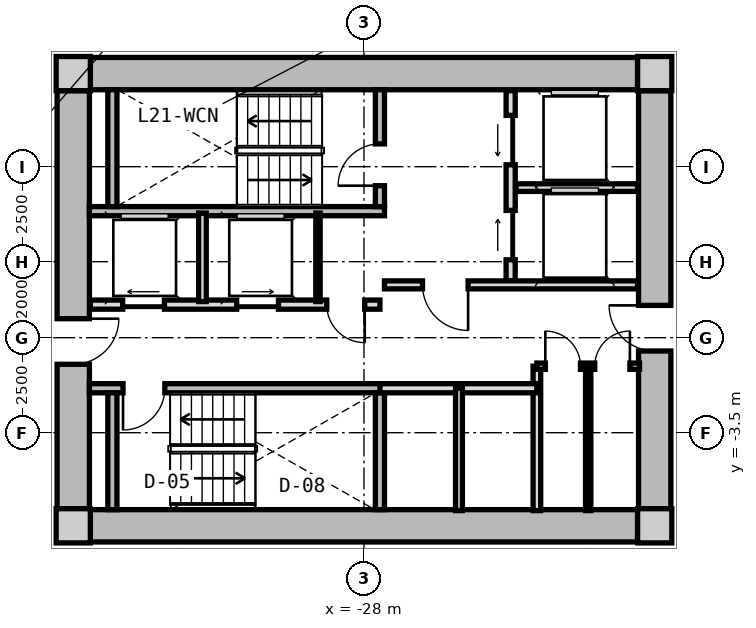
"""IFC4 building model, lengths in metres.
Left out: names, types, materials, properties, quantities, classifications, styles, units other than length and angle.
Written with IfcOpenShell. Run it as: python <this file> out.ifc"""

import sys

from ifc_helpers import new_model, si_unit, direction, frame, frame_2d, origin, origin_2d, place, context, subcontext, project, spatial, rectangle, extrude, source, transform, mapped, element, fill, save


model = new_model("IFC4")
c1 = context("Model", 3, precision=1e-05, world=origin(), true_north=direction((0.0, 1.0)))
c2 = subcontext(c1, "Body", "Model", "MODEL_VIEW")
j1 = project(units=[si_unit("LENGTHUNIT", "METRE"), si_unit("PLANEANGLEUNIT", "RADIAN")], contexts=[c1])
p1 = place(None, origin())
s1 = spatial("IfcSite", under=j1, at=p1, CompositionType="ELEMENT")
p2 = place(p1, origin())
s2 = spatial("IfcBuilding", under=s1, at=p2, CompositionType="ELEMENT")
p3 = place(p2, frame((0.0, 0.0, 70.4)))
s3 = spatial("IfcBuildingStorey", under=s2, at=p3, CompositionType="ELEMENT", Elevation=70.4)
m1 = source(origin(), c2, "Body", "SweptSolid", [
    extrude(rectangle(XDim=0.9, YDim=0.9, at=origin_2d()), origin(), (0.0, 0.0, 1.0), 3.05),
])
for number, where, z_axis, x_axis in (
    (1, (-35.65, -5.95, 0.0), (0.0, 0.0, 1.0), (1.0, 0.0, 0.0)),
    (2, (-20.35, -5.95, 0.0), (0.0, 0.0, 1.0), (1.0, 0.0, 0.0)),
    (3, (-20.35, 5.95, 0.0), (0.0, 0.0, 1.0), (1.0, 0.0, 0.0)),
    (4, (-35.65, 5.95, 0.0), (0.0, 0.0, 1.0), (1.0, 0.0, 0.0)),
):
    element("IfcColumn", number, at=place(p3, frame(where, z_axis=z_axis, x_axis=x_axis)), inside=s3, PredefinedType="COLUMN", context=c2, shape_type="MappedRepresentation", body=[
        mapped(m1, transform((0.0, 0.0, 0.0), x_axis=(1.0, 0.0, 0.0), y_axis=(0.0, 1.0, 0.0), z_axis=(0.0, 0.0, 1.0), scale=1.0)),
    ])
m2 = source(origin(), c2, "Body", "SweptSolid", [
    extrude(rectangle(XDim=14.4, YDim=0.85, at=frame_2d((7.2, 0.0))), origin(), (0.0, 0.0, 1.0), 2.73),
])
for number, where, z_axis, x_axis in (
    (5, (-35.2, 5.95, 0.0), (0.0, 0.0, 1.0), (1.0, 0.0, 0.0)),
    (6, (-20.8, -5.95, 0.0), (0.0, 0.0, 1.0), (-1.0, 0.0, 0.0)),
):
    element("IfcWall", number, at=place(p3, frame(where, z_axis=z_axis, x_axis=x_axis)), inside=s3, PredefinedType="SHEAR", context=c2, shape_type="MappedRepresentation", body=[
        mapped(m2, transform((0.0, 0.0, 0.0), x_axis=(1.0, 0.0, 0.0), y_axis=(0.0, 1.0, 0.0), z_axis=(0.0, 0.0, 1.0), scale=1.0)),
    ])
m3 = source(origin(), c2, "Body", "SweptSolid", [
    extrude(rectangle(XDim=11.0, YDim=0.85, at=frame_2d((5.5, 0.0))), origin(), (0.0, 0.0, 1.0), 2.73),
])
p4 = place(p3, frame((-35.65, -5.5, 0.0), z_axis=(0.0, 0.0, 1.0), x_axis=(0.0, 1.0, 0.0)))
e7 = element("IfcWall", 7, at=p4, inside=s3, PredefinedType="SHEAR", context=c2, shape_type="MappedRepresentation", body=[
    mapped(m3, transform((0.0, 0.0, 0.0), x_axis=(1.0, 0.0, 0.0), y_axis=(0.0, 1.0, 0.0), z_axis=(0.0, 0.0, 1.0), scale=1.0)),
])
p5 = place(p4, frame((3.8, 0.0, 0.0)))
e8 = element("IfcOpeningElement", 8, at=p5, cuts=e7, PredefinedType="OPENING", context=c2, shape_type="SweptSolid", body=[
    extrude(rectangle(XDim=1.2, YDim=2.15, at=frame_2d((0.6, 1.075))), frame((0.0, 0.435, 0.0), z_axis=(0.0, -1.0, 0.0), x_axis=(1.0, 0.0, 0.0)), (0.0, 0.0, 1.0), 0.87),
])
p6 = place(p3, frame((-20.35, 5.5, 0.0), z_axis=(0.0, 0.0, 1.0), x_axis=(0.0, -1.0, 0.0)))
e9 = element("IfcWall", 9, at=p6, inside=s3, PredefinedType="SHEAR", context=c2, shape_type="MappedRepresentation", body=[
    mapped(m3, transform((0.0, 0.0, 0.0), x_axis=(1.0, 0.0, 0.0), y_axis=(0.0, 1.0, 0.0), z_axis=(0.0, 0.0, 1.0), scale=1.0)),
])
p7 = place(p6, frame((5.65, 0.0, 0.0)))
e10 = element("IfcOpeningElement", 10, at=p7, cuts=e9, PredefinedType="OPENING", context=c2, shape_type="SweptSolid", body=[
    extrude(rectangle(XDim=1.2, YDim=2.15, at=frame_2d((0.6, 1.075))), frame((0.0, 0.435, 0.0), z_axis=(0.0, -1.0, 0.0), x_axis=(1.0, 0.0, 0.0)), (0.0, 0.0, 1.0), 0.87),
])
m4 = source(origin(), c2, "Body", "SweptSolid", [
    extrude(rectangle(XDim=7.765, YDim=0.24, at=frame_2d((3.883, 0.0))), origin(), (0.0, 0.0, 1.0), 2.73),
])
p8 = place(p3, frame((-35.225, 2.33, 0.0), z_axis=(0.0, 0.0, 1.0), x_axis=(1.0, 0.0, 0.0)))
e11 = element("IfcWall", 11, at=p8, inside=s3, PredefinedType="PARTITIONING", context=c2, shape_type="MappedRepresentation", body=[
    mapped(m4, transform((0.0, 0.0, 0.0), x_axis=(1.0, 0.0, 0.0), y_axis=(0.0, 1.0, 0.0), z_axis=(0.0, 0.0, 1.0), scale=1.0)),
])
m5 = source(origin(), c2, "Body", "SweptSolid", [
    extrude(rectangle(XDim=3.075, YDim=0.24, at=frame_2d((1.538, 0.0))), origin(), (0.0, 0.0, 1.0), 2.73),
])
p9 = place(p3, frame((-34.62, 2.45, 0.0), z_axis=(0.0, 0.0, 1.0), x_axis=(0.0, 1.0, 0.0)))
e12 = element("IfcWall", 12, at=p9, inside=s3, PredefinedType="PARTITIONING", context=c2, shape_type="MappedRepresentation", body=[
    mapped(m5, transform((0.0, 0.0, 0.0), x_axis=(1.0, 0.0, 0.0), y_axis=(0.0, 1.0, 0.0), z_axis=(0.0, 0.0, 1.0), scale=1.0)),
])
p10 = place(p3, frame((-27.58, 2.45, 0.0), z_axis=(0.0, 0.0, 1.0), x_axis=(0.0, 1.0, 0.0)))
e13 = element("IfcWall", 13, at=p10, inside=s3, PredefinedType="PARTITIONING", context=c2, shape_type="MappedRepresentation", body=[
    mapped(m5, transform((0.0, 0.0, 0.0), x_axis=(1.0, 0.0, 0.0), y_axis=(0.0, 1.0, 0.0), z_axis=(0.0, 0.0, 1.0), scale=1.0)),
])
p11 = place(p10, frame((0.55, 0.0, 0.0)))
e14 = element("IfcOpeningElement", 14, at=p11, cuts=e13, PredefinedType="OPENING", context=c2, shape_type="SweptSolid", body=[
    extrude(rectangle(XDim=1.1, YDim=2.15, at=frame_2d((0.55, 1.075))), frame((0.0, 0.13, 0.0), z_axis=(0.0, -1.0, 0.0), x_axis=(1.0, 0.0, 0.0)), (0.0, 0.0, 1.0), 0.26),
])
p12 = place(p3, frame((-35.225, -2.33, 0.0), z_axis=(0.0, 0.0, 1.0), x_axis=(1.0, 0.0, 0.0)))
e15 = element("IfcWall", 15, at=p12, inside=s3, PredefinedType="PARTITIONING", context=c2, shape_type="MappedRepresentation", body=[
    mapped(m4, transform((0.0, 0.0, 0.0), x_axis=(1.0, 0.0, 0.0), y_axis=(0.0, 1.0, 0.0), z_axis=(0.0, 0.0, 1.0), scale=1.0)),
])
p13 = place(p12, frame((0.885, 0.0, 0.0)))
e16 = element("IfcOpeningElement", 16, at=p13, cuts=e15, PredefinedType="OPENING", context=c2, shape_type="SweptSolid", body=[
    extrude(rectangle(XDim=1.1, YDim=2.15, at=frame_2d((0.55, 1.075))), frame((0.0, 0.13, 0.0), z_axis=(0.0, -1.0, 0.0), x_axis=(1.0, 0.0, 0.0)), (0.0, 0.0, 1.0), 0.26),
])
for number, where, z_axis, x_axis in (
    (17, (-34.62, -5.525, 0.0), (0.0, 0.0, 1.0), (0.0, 1.0, 0.0)),
    (18, (-27.58, -5.525, 0.0), (0.0, 0.0, 1.0), (0.0, 1.0, 0.0)),
):
    element("IfcWall", number, at=place(p3, frame(where, z_axis=z_axis, x_axis=x_axis)), inside=s3, PredefinedType="PARTITIONING", context=c2, shape_type="MappedRepresentation", body=[
        mapped(m5, transform((0.0, 0.0, 0.0), x_axis=(1.0, 0.0, 0.0), y_axis=(0.0, 1.0, 0.0), z_axis=(0.0, 0.0, 1.0), scale=1.0)),
    ])
m6 = source(origin(), c2, "Body", "SweptSolid", [
    extrude(rectangle(XDim=5.0, YDim=0.24, at=frame_2d((2.5, 0.0))), origin(), (0.0, 0.0, 1.0), 2.715),
])
p14 = place(p3, frame((-24.14, 0.5, 0.0), z_axis=(0.0, 0.0, 1.0), x_axis=(0.0, 1.0, 0.0)))
e19 = element("IfcWall", 19, at=p14, inside=s3, PredefinedType="PARTITIONING", context=c2, shape_type="MappedRepresentation", body=[
    mapped(m6, transform((0.0, 0.0, 0.0), x_axis=(1.0, 0.0, 0.0), y_axis=(0.0, 1.0, 0.0), z_axis=(0.0, 0.0, 1.0), scale=1.0)),
])
p15 = place(p14, frame((3.05, 0.0, 0.0)))
e20 = element("IfcOpeningElement", 20, at=p15, cuts=e19, PredefinedType="OPENING", context=c2, shape_type="SweptSolid", body=[
    extrude(rectangle(XDim=1.3, YDim=2.2, at=frame_2d((0.65, 1.1))), frame((0.0, 0.13, 0.0), z_axis=(0.0, -1.0, 0.0), x_axis=(1.0, 0.0, 0.0)), (0.0, 0.0, 1.0), 0.26),
])
p16 = place(p14, frame((0.55, 0.0, 0.0)))
e21 = element("IfcOpeningElement", 21, at=p16, cuts=e19, PredefinedType="OPENING", context=c2, shape_type="SweptSolid", body=[
    extrude(rectangle(XDim=1.3, YDim=2.2, at=frame_2d((0.65, 1.1))), frame((0.0, 0.13, 0.0), z_axis=(0.0, -1.0, 0.0), x_axis=(1.0, 0.0, 0.0)), (0.0, 0.0, 1.0), 0.26),
])
m7 = source(origin(), c2, "Body", "SweptSolid", [
    extrude(rectangle(XDim=3.2, YDim=0.2, at=frame_2d((1.6, 0.0))), origin(), (0.0, 0.0, 1.0), 2.715),
])
p17 = place(p3, frame((-24.0, 2.95, 0.0), z_axis=(0.0, 0.0, 1.0), x_axis=(1.0, 0.0, 0.0)))
e22 = element("IfcWall", 22, at=p17, inside=s3, PredefinedType="PARTITIONING", context=c2, shape_type="MappedRepresentation", body=[
    mapped(m7, transform((0.0, 0.0, 0.0), x_axis=(1.0, 0.0, 0.0), y_axis=(0.0, 1.0, 0.0), z_axis=(0.0, 0.0, 1.0), scale=1.0)),
])
m8 = source(origin(), c2, "Body", "SweptSolid", [
    extrude(rectangle(XDim=6.66, YDim=0.21, at=frame_2d((3.33, 0.0))), origin(), (0.0, 0.0, 1.0), 2.715),
])
p18 = place(p3, frame((-27.46, 0.39, 0.0), z_axis=(0.0, 0.0, 1.0), x_axis=(1.0, 0.0, 0.0)))
e23 = element("IfcWall", 23, at=p18, inside=s3, PredefinedType="PARTITIONING", context=c2, shape_type="MappedRepresentation", body=[
    mapped(m8, transform((0.0, 0.0, 0.0), x_axis=(1.0, 0.0, 0.0), y_axis=(0.0, 1.0, 0.0), z_axis=(0.0, 0.0, 1.0), scale=1.0)),
])
p19 = place(p18, frame((1.0, 0.0, 0.0)))
e24 = element("IfcOpeningElement", 24, at=p19, cuts=e23, PredefinedType="OPENING", context=c2, shape_type="SweptSolid", body=[
    extrude(rectangle(XDim=1.2, YDim=2.15, at=frame_2d((0.6, 1.075))), frame((0.0, 0.115, 0.0), z_axis=(0.0, -1.0, 0.0), x_axis=(1.0, 0.0, 0.0)), (0.0, 0.0, 1.0), 0.23),
])
m9 = source(origin(), c2, "Body", "SweptSolid", [
    extrude(rectangle(XDim=7.62, YDim=0.24, at=frame_2d((3.81, 0.0))), origin(), (0.0, 0.0, 1.0), 2.715),
])
p20 = place(p3, frame((-35.2, -0.13, 0.0), z_axis=(0.0, 0.0, 1.0), x_axis=(1.0, 0.0, 0.0)))
e25 = element("IfcWall", 25, at=p20, inside=s3, PredefinedType="PARTITIONING", context=c2, shape_type="MappedRepresentation", body=[
    mapped(m9, transform((0.0, 0.0, 0.0), x_axis=(1.0, 0.0, 0.0), y_axis=(0.0, 1.0, 0.0), z_axis=(0.0, 0.0, 1.0), scale=1.0)),
])
p21 = place(p20, frame((6.22, 0.0, 0.0)))
e26 = element("IfcOpeningElement", 26, at=p21, cuts=e25, PredefinedType="OPENING", context=c2, shape_type="SweptSolid", body=[
    extrude(rectangle(XDim=1.0, YDim=2.1, at=frame_2d((0.5, 1.05))), frame((0.0, 0.13, 0.0), z_axis=(0.0, -1.0, 0.0), x_axis=(1.0, 0.0, 0.0)), (0.0, 0.0, 1.0), 0.26),
])
p22 = place(p20, frame((0.85, 0.0, 0.0)))
e27 = element("IfcOpeningElement", 27, at=p22, cuts=e25, PredefinedType="OPENING", context=c2, shape_type="SweptSolid", body=[
    extrude(rectangle(XDim=1.1, YDim=2.2, at=frame_2d((0.55, 1.1))), frame((0.0, 0.13, 0.0), z_axis=(0.0, -1.0, 0.0), x_axis=(1.0, 0.0, 0.0)), (0.0, 0.0, 1.0), 0.26),
])
p23 = place(p20, frame((3.85, 0.0, 0.0)))
e28 = element("IfcOpeningElement", 28, at=p23, cuts=e25, PredefinedType="OPENING", context=c2, shape_type="SweptSolid", body=[
    extrude(rectangle(XDim=1.1, YDim=2.2, at=frame_2d((0.55, 1.1))), frame((0.0, 0.13, 0.0), z_axis=(0.0, -1.0, 0.0), x_axis=(1.0, 0.0, 0.0)), (0.0, 0.0, 1.0), 0.26),
])
m10 = source(origin(), c2, "Body", "SweptSolid", [
    extrude(rectangle(XDim=2.33, YDim=0.115, at=frame_2d((1.165, 0.0))), origin(), (0.0, 0.0, 1.0), 2.715),
])
p24 = place(p3, frame((-29.21, -0.05, 0.0), z_axis=(0.0, 0.0, 1.0), x_axis=(0.0, 1.0, 0.0)))
e29 = element("IfcWall", 29, at=p24, inside=s3, PredefinedType="PARTITIONING", context=c2, shape_type="MappedRepresentation", body=[
    mapped(m10, transform((0.0, 0.0, 0.0), x_axis=(1.0, 0.0, 0.0), y_axis=(0.0, 1.0, 0.0), z_axis=(0.0, 0.0, 1.0), scale=1.0)),
])
m11 = source(origin(), c2, "Body", "SweptSolid", [
    extrude(rectangle(XDim=2.33, YDim=0.2, at=frame_2d((1.165, 0.0))), origin(), (0.0, 0.0, 1.0), 2.715),
])
p25 = place(p3, frame((-32.25, -0.05, 0.0), z_axis=(0.0, 0.0, 1.0), x_axis=(0.0, 1.0, 0.0)))
e30 = element("IfcWall", 30, at=p25, inside=s3, PredefinedType="PARTITIONING", context=c2, shape_type="MappedRepresentation", body=[
    mapped(m11, transform((0.0, 0.0, 0.0), x_axis=(1.0, 0.0, 0.0), y_axis=(0.0, 1.0, 0.0), z_axis=(0.0, 0.0, 1.0), scale=1.0)),
])
m12 = source(origin(), c2, "Body", "SweptSolid", [
    extrude(rectangle(XDim=3.8, YDim=0.2, at=frame_2d((1.9, 0.0))), origin(), (0.0, 0.0, 1.0), 2.715),
])
p26 = place(p3, frame((-23.45, -5.55, 0.0), z_axis=(0.0, 0.0, 1.0), x_axis=(0.0, 1.0, 0.0)))
e31 = element("IfcWall", 31, at=p26, inside=s3, PredefinedType="PARTITIONING", context=c2, shape_type="MappedRepresentation", body=[
    mapped(m12, transform((0.0, 0.0, 0.0), x_axis=(1.0, 0.0, 0.0), y_axis=(0.0, 1.0, 0.0), z_axis=(0.0, 0.0, 1.0), scale=1.0)),
])
m13 = source(origin(), c2, "Body", "SweptSolid", [
    extrude(rectangle(XDim=4.13, YDim=0.24, at=frame_2d((2.065, 0.0))), origin(), (0.0, 0.0, 1.0), 2.715),
])
p27 = place(p3, frame((-27.58, -2.33, 0.0), z_axis=(0.0, 0.0, 1.0), x_axis=(1.0, 0.0, 0.0)))
e32 = element("IfcWall", 32, at=p27, inside=s3, PredefinedType="PARTITIONING", context=c2, shape_type="MappedRepresentation", body=[
    mapped(m13, transform((0.0, 0.0, 0.0), x_axis=(1.0, 0.0, 0.0), y_axis=(0.0, 1.0, 0.0), z_axis=(0.0, 0.0, 1.0), scale=1.0)),
])
m14 = source(origin(), c2, "Body", "SweptSolid", [
    extrude(rectangle(XDim=3.22, YDim=0.18, at=frame_2d((1.61, 0.0))), origin(), (0.0, 0.0, 1.0), 2.715),
])
p28 = place(p3, frame((-25.5, -5.55, 0.0), z_axis=(0.0, 0.0, 1.0), x_axis=(0.0, 1.0, 0.0)))
e33 = element("IfcWall", 33, at=p28, inside=s3, PredefinedType="PARTITIONING", context=c2, shape_type="MappedRepresentation", body=[
    mapped(m14, transform((0.0, 0.0, 0.0), x_axis=(1.0, 0.0, 0.0), y_axis=(0.0, 1.0, 0.0), z_axis=(0.0, 0.0, 1.0), scale=1.0)),
])
m15 = source(origin(), c2, "Body", "SweptSolid", [
    extrude(rectangle(XDim=2.7, YDim=0.165, at=frame_2d((1.35, 0.0))), origin(), (0.0, 0.0, 1.0), 2.715),
])
p29 = place(p3, frame((-23.45, -1.75, 0.0), z_axis=(0.0, 0.0, 1.0), x_axis=(1.0, 0.0, 0.0)))
e34 = element("IfcWall", 34, at=p29, inside=s3, PredefinedType="PARTITIONING", context=c2, shape_type="MappedRepresentation", body=[
    mapped(m15, transform((0.0, 0.0, 0.0), x_axis=(1.0, 0.0, 0.0), y_axis=(0.0, 1.0, 0.0), z_axis=(0.0, 0.0, 1.0), scale=1.0)),
])
p30 = place(p29, frame((0.222, 0.0, 0.0)))
e35 = element("IfcOpeningElement", 35, at=p30, cuts=e34, PredefinedType="OPENING", context=c2, shape_type="SweptSolid", body=[
    extrude(rectangle(XDim=0.925, YDim=2.1, at=frame_2d((0.462, 1.05))), frame((0.0, 0.093, 0.0), z_axis=(0.0, -1.0, 0.0), x_axis=(1.0, 0.0, 0.0)), (0.0, 0.0, 1.0), 0.185),
])
p31 = place(p29, frame((1.522, 0.0, 0.0)))
e36 = element("IfcOpeningElement", 36, at=p31, cuts=e34, PredefinedType="OPENING", context=c2, shape_type="SweptSolid", body=[
    extrude(rectangle(XDim=0.925, YDim=2.1, at=frame_2d((0.462, 1.05))), frame((0.0, 0.093, 0.0), z_axis=(0.0, -1.0, 0.0), x_axis=(1.0, 0.0, 0.0)), (0.0, 0.0, 1.0), 0.185),
])
m16 = source(origin(), c2, "Body", "SweptSolid", [
    extrude(rectangle(XDim=3.8, YDim=0.14, at=frame_2d((1.9, 0.0))), origin(), (0.0, 0.0, 1.0), 2.715),
])
p32 = place(p3, frame((-22.1, -5.55, 0.0), z_axis=(0.0, 0.0, 1.0), x_axis=(0.0, 1.0, 0.0)))
e37 = element("IfcWall", 37, at=p32, inside=s3, PredefinedType="PARTITIONING", context=c2, shape_type="MappedRepresentation", body=[
    mapped(m16, transform((0.0, 0.0, 0.0), x_axis=(1.0, 0.0, 0.0), y_axis=(0.0, 1.0, 0.0), z_axis=(0.0, 0.0, 1.0), scale=1.0)),
])
m17 = source(origin(), c2, "Body", "SweptSolid", [
    extrude(rectangle(XDim=1.1, YDim=2.15, at=frame_2d((0.55, 1.075))), frame((0.0, 0.025, 0.0), z_axis=(0.0, -1.0, 0.0), x_axis=(1.0, 0.0, 0.0)), (0.0, 0.0, 1.0), 0.05),
])
p33 = place(p11, origin())
e38 = element("IfcDoor", 38, at=p33, inside=s3, OperationType="SINGLE_SWING_LEFT", PredefinedType="DOOR", context=c2, shape_type="MappedRepresentation", body=[
    mapped(m17, transform((0.0, 0.0, 0.0), x_axis=(1.0, 0.0, 0.0), y_axis=(0.0, 1.0, 0.0), z_axis=(0.0, 0.0, 1.0), scale=1.0)),
])
fill(e14, e38)
p34 = place(p13, frame((1.1, 0.0, 0.0), z_axis=(0.0, 0.0, 1.0), x_axis=(-1.0, 0.0, 0.0)))
e39 = element("IfcDoor", 39, at=p34, inside=s3, OperationType="SINGLE_SWING_RIGHT", PredefinedType="DOOR", context=c2, shape_type="MappedRepresentation", body=[
    mapped(m17, transform((0.0, 0.0, 0.0), x_axis=(1.0, 0.0, 0.0), y_axis=(0.0, 1.0, 0.0), z_axis=(0.0, 0.0, 1.0), scale=1.0)),
])
fill(e16, e39)
m18 = source(origin(), c2, "Body", "SweptSolid", [
    extrude(rectangle(XDim=1.3, YDim=2.2, at=frame_2d((0.65, 1.1))), frame((0.0, 0.025, 0.0), z_axis=(0.0, -1.0, 0.0), x_axis=(1.0, 0.0, 0.0)), (0.0, 0.0, 1.0), 0.05),
])
p35 = place(p15, origin())
e40 = element("IfcDoor", 40, at=p35, inside=s3, OperationType="SLIDING_TO_LEFT", PredefinedType="DOOR", context=c2, shape_type="MappedRepresentation", body=[
    mapped(m18, transform((0.0, 0.0, 0.0), x_axis=(1.0, 0.0, 0.0), y_axis=(0.0, 1.0, 0.0), z_axis=(0.0, 0.0, 1.0), scale=1.0)),
])
fill(e20, e40)
p36 = place(p16, origin())
e41 = element("IfcDoor", 41, at=p36, inside=s3, OperationType="SLIDING_TO_RIGHT", PredefinedType="DOOR", context=c2, shape_type="MappedRepresentation", body=[
    mapped(m18, transform((0.0, 0.0, 0.0), x_axis=(1.0, 0.0, 0.0), y_axis=(0.0, 1.0, 0.0), z_axis=(0.0, 0.0, 1.0), scale=1.0)),
])
fill(e21, e41)
m19 = source(origin(), c2, "Body", "SweptSolid", [
    extrude(rectangle(XDim=1.2, YDim=2.15, at=frame_2d((0.6, 1.075))), frame((0.0, 0.025, 0.0), z_axis=(0.0, -1.0, 0.0), x_axis=(1.0, 0.0, 0.0)), (0.0, 0.0, 1.0), 0.05),
])
p37 = place(p19, frame((1.2, 0.0, 0.0), z_axis=(0.0, 0.0, 1.0), x_axis=(-1.0, 0.0, 0.0)))
e42 = element("IfcDoor", 42, at=p37, inside=s3, OperationType="SINGLE_SWING_LEFT", PredefinedType="DOOR", context=c2, shape_type="MappedRepresentation", body=[
    mapped(m19, transform((0.0, 0.0, 0.0), x_axis=(1.0, 0.0, 0.0), y_axis=(0.0, 1.0, 0.0), z_axis=(0.0, 0.0, 1.0), scale=1.0)),
])
fill(e24, e42)
p38 = place(p5, frame((1.2, 0.0, 0.0), z_axis=(0.0, 0.0, 1.0), x_axis=(-1.0, 0.0, 0.0)))
e43 = element("IfcDoor", 43, at=p38, inside=s3, OperationType="SINGLE_SWING_LEFT", PredefinedType="DOOR", context=c2, shape_type="MappedRepresentation", body=[
    mapped(m19, transform((0.0, 0.0, 0.0), x_axis=(1.0, 0.0, 0.0), y_axis=(0.0, 1.0, 0.0), z_axis=(0.0, 0.0, 1.0), scale=1.0)),
])
fill(e8, e43)
p39 = place(p7, frame((1.2, 0.0, 0.0), z_axis=(0.0, 0.0, 1.0), x_axis=(-1.0, 0.0, 0.0)))
e44 = element("IfcDoor", 44, at=p39, inside=s3, OperationType="SINGLE_SWING_RIGHT", PredefinedType="DOOR", context=c2, shape_type="MappedRepresentation", body=[
    mapped(m19, transform((0.0, 0.0, 0.0), x_axis=(1.0, 0.0, 0.0), y_axis=(0.0, 1.0, 0.0), z_axis=(0.0, 0.0, 1.0), scale=1.0)),
])
fill(e10, e44)
m20 = source(origin(), c2, "Body", "SweptSolid", [
    extrude(rectangle(XDim=1.0, YDim=2.1, at=frame_2d((0.5, 1.05))), frame((0.0, 0.025, 0.0), z_axis=(0.0, -1.0, 0.0), x_axis=(1.0, 0.0, 0.0)), (0.0, 0.0, 1.0), 0.05),
])
p40 = place(p21, frame((1.0, 0.0, 0.0), z_axis=(0.0, 0.0, 1.0), x_axis=(-1.0, 0.0, 0.0)))
e45 = element("IfcDoor", 45, at=p40, inside=s3, OperationType="SINGLE_SWING_LEFT", PredefinedType="DOOR", context=c2, shape_type="MappedRepresentation", body=[
    mapped(m20, transform((0.0, 0.0, 0.0), x_axis=(1.0, 0.0, 0.0), y_axis=(0.0, 1.0, 0.0), z_axis=(0.0, 0.0, 1.0), scale=1.0)),
])
fill(e26, e45)
m21 = source(origin(), c2, "Body", "SweptSolid", [
    extrude(rectangle(XDim=1.1, YDim=2.2, at=frame_2d((0.55, 1.1))), frame((0.0, 0.025, 0.0), z_axis=(0.0, -1.0, 0.0), x_axis=(1.0, 0.0, 0.0)), (0.0, 0.0, 1.0), 0.05),
])
p41 = place(p22, origin())
e46 = element("IfcDoor", 46, at=p41, inside=s3, OperationType="SLIDING_TO_LEFT", PredefinedType="DOOR", context=c2, shape_type="MappedRepresentation", body=[
    mapped(m21, transform((0.0, 0.0, 0.0), x_axis=(1.0, 0.0, 0.0), y_axis=(0.0, 1.0, 0.0), z_axis=(0.0, 0.0, 1.0), scale=1.0)),
])
fill(e27, e46)
p42 = place(p23, origin())
e47 = element("IfcDoor", 47, at=p42, inside=s3, OperationType="SLIDING_TO_RIGHT", PredefinedType="DOOR", context=c2, shape_type="MappedRepresentation", body=[
    mapped(m21, transform((0.0, 0.0, 0.0), x_axis=(1.0, 0.0, 0.0), y_axis=(0.0, 1.0, 0.0), z_axis=(0.0, 0.0, 1.0), scale=1.0)),
])
fill(e28, e47)
m22 = source(origin(), c2, "Body", "SweptSolid", [
    extrude(rectangle(XDim=0.925, YDim=2.1, at=frame_2d((0.462, 1.05))), frame((0.0, 0.025, 0.0), z_axis=(0.0, -1.0, 0.0), x_axis=(1.0, 0.0, 0.0)), (0.0, 0.0, 1.0), 0.05),
])
p43 = place(p30, origin())
e48 = element("IfcDoor", 48, at=p43, inside=s3, OperationType="SINGLE_SWING_LEFT", PredefinedType="DOOR", context=c2, shape_type="MappedRepresentation", body=[
    mapped(m22, transform((0.0, 0.0, 0.0), x_axis=(1.0, 0.0, 0.0), y_axis=(0.0, 1.0, 0.0), z_axis=(0.0, 0.0, 1.0), scale=1.0)),
])
fill(e35, e48)
p44 = place(p31, origin())
e49 = element("IfcDoor", 49, at=p44, inside=s3, OperationType="SINGLE_SWING_RIGHT", PredefinedType="DOOR", context=c2, shape_type="MappedRepresentation", body=[
    mapped(m22, transform((0.0, 0.0, 0.0), x_axis=(1.0, 0.0, 0.0), y_axis=(0.0, 1.0, 0.0), z_axis=(0.0, 0.0, 1.0), scale=1.0)),
])
fill(e36, e49)
save(model, sys.argv[1])
